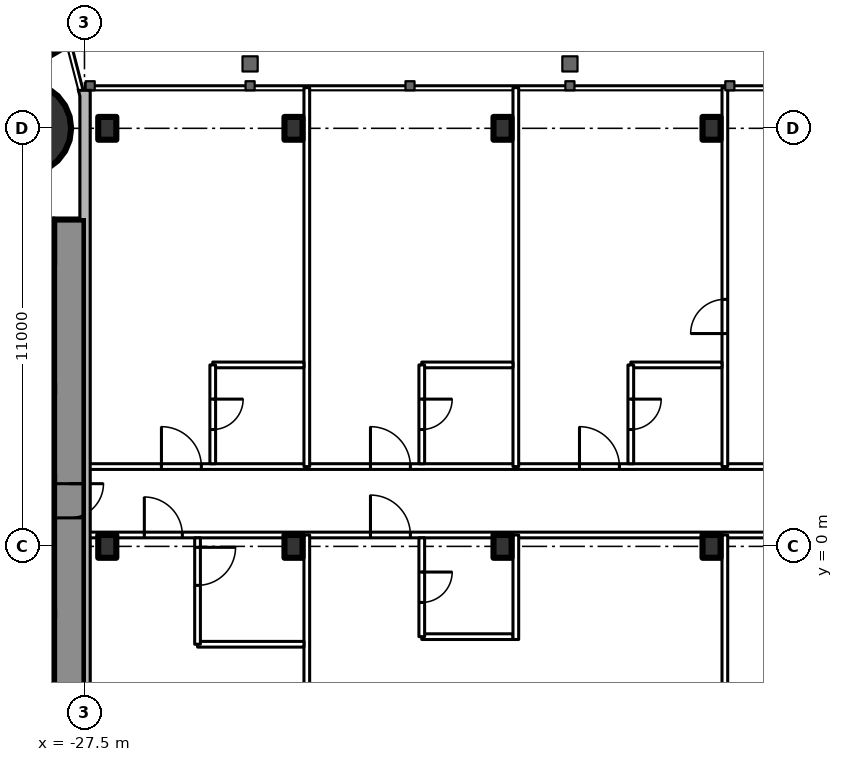
"""IFC4 building model, lengths in metres.
Left out: names, types, materials, properties, quantities, classifications, styles, units other than length and angle.
Written with IfcOpenShell. Run it as: python <this file> out.ifc"""

import sys

from ifc_helpers import new_model, si_unit, direction, frame, frame_2d, origin, origin_2d, place, context, subcontext, project, spatial, rectangle, circle, i_section, extrude, element, fill, save


model = new_model("IFC4")
c1 = context("Model", 3, precision=1e-05, world=origin(), true_north=direction((0.0, 1.0)))
c2 = subcontext(c1, "Body", "Model", "MODEL_VIEW")
j1 = project(units=[si_unit("LENGTHUNIT", "METRE"), si_unit("PLANEANGLEUNIT", "RADIAN")], contexts=[c1])
p1 = place(None, origin())
s1 = spatial("IfcSite", under=j1, at=p1, CompositionType="ELEMENT")
p2 = place(p1, origin())
s2 = spatial("IfcBuilding", under=s1, at=p2, CompositionType="ELEMENT")
p3 = place(p2, frame((0.0, 0.0, 233.3)))
s3 = spatial("IfcBuildingStorey", under=s2, at=p3, CompositionType="ELEMENT", Elevation=233.3)
p4 = place(p3, frame((-29.05, 11.0, 0.0), z_axis=(0.0, 0.0, 1.0), x_axis=(1.0, 0.0, 0.0)))
e1 = element("IfcColumn", 1, at=p4, inside=s3, PredefinedType="COLUMN", context=c2, shape_type="SweptSolid", body=[
    extrude(circle(Radius=1.2, at=origin_2d()), origin(), (0.0, 0.0, 1.0), 3.6),
])
p5 = place(p3, frame((-27.9, 8.6, 0.0), z_axis=(0.0, 0.0, 1.0), x_axis=(0.0, -1.0, 0.0)))
e2 = element("IfcWall", 2, at=p5, inside=s3, PredefinedType="SHEAR", context=c2, shape_type="SweptSolid", body=[
    extrude(rectangle(XDim=17.2, YDim=0.8, at=frame_2d((8.6, 0.0))), origin(), (0.0, 0.0, 1.0), 3.6),
])
p6 = place(p5, frame((6.95, 0.0, 0.0)))
e3 = element("IfcOpeningElement", 3, at=p6, cuts=e2, PredefinedType="OPENING", context=c2, shape_type="SweptSolid", body=[
    extrude(rectangle(XDim=0.9, YDim=2.2, at=frame_2d((0.45, 1.1))), frame((0.0, 0.41, 0.0), z_axis=(0.0, -1.0, 0.0), x_axis=(1.0, 0.0, 0.0)), (0.0, 0.0, 1.0), 0.82),
])
p7 = place(p3, frame((-28.3, 8.0, 0.0), z_axis=(0.0, 0.0, 1.0), x_axis=(-1.0, 0.0, 0.0)))
e4 = element("IfcWall", 4, at=p7, inside=s3, PredefinedType="SHEAR", context=c2, shape_type="SweptSolid", body=[
    extrude(rectangle(XDim=8.4, YDim=1.2, at=frame_2d((4.2, 0.0))), origin(), (0.0, 0.0, 1.0), 3.6),
])
p8 = place(p7, frame((0.25, 0.0, 0.0)))
e5 = element("IfcOpeningElement", 5, at=p8, cuts=e4, PredefinedType="OPENING", context=c2, shape_type="SweptSolid", body=[
    extrude(rectangle(XDim=1.0, YDim=2.2, at=frame_2d((0.5, 1.1))), frame((0.0, 0.61, 0.0), z_axis=(0.0, -1.0, 0.0), x_axis=(1.0, 0.0, 0.0)), (0.0, 0.0, 1.0), 1.22),
])
p9 = place(p3, frame((-28.3, 4.15, 0.0), z_axis=(0.0, 0.0, 1.0), x_axis=(-1.0, 0.0, 0.0)))
e6 = element("IfcWall", 6, at=p9, inside=s3, PredefinedType="SHEAR", context=c2, shape_type="SweptSolid", body=[
    extrude(rectangle(XDim=8.4, YDim=0.3, at=frame_2d((4.2, 0.0))), origin(), (0.0, 0.0, 1.0), 3.6),
])
for number, where, z_axis, x_axis in (
    (7, (-28.3, 1.775, 0.0), (0.0, 0.0, 1.0), (-1.0, 0.0, 0.0)),
    (8, (-28.3, -1.775, 0.0), (0.0, 0.0, 1.0), (-1.0, 0.0, 0.0)),
):
    element("IfcWall", number, at=place(p3, frame(where, z_axis=z_axis, x_axis=x_axis)), inside=s3, PredefinedType="SHEAR", context=c2, shape_type="SweptSolid", body=[
        extrude(rectangle(XDim=2.9, YDim=0.25, at=frame_2d((1.45, 0.0))), origin(), (0.0, 0.0, 1.0), 3.6),
    ])
p10 = place(p3, frame((-27.2, 14.3, 0.0), z_axis=(0.0, 0.0, 1.0), x_axis=(-0.866026593062, -0.499997940104, 0.0)))
e9 = element("IfcWall", 9, at=p10, inside=s3, PredefinedType="SHEAR", context=c2, shape_type="SweptSolid", body=[
    extrude(rectangle(XDim=28.946, YDim=1.2, at=frame_2d((14.473, 0.0))), origin(), (0.0, 0.0, 1.0), 3.6),
])
p11 = place(p10, frame((4.6, 0.0, 0.0)))
e10 = element("IfcOpeningElement", 10, at=p11, cuts=e9, PredefinedType="OPENING", context=c2, shape_type="SweptSolid", body=[
    extrude(rectangle(XDim=1.0, YDim=2.2, at=frame_2d((0.5, 1.1))), frame((0.0, 0.61, 0.0), z_axis=(0.0, -1.0, 0.0), x_axis=(1.0, 0.0, 0.0)), (0.0, 0.0, 1.0), 1.22),
])
p12 = place(p10, frame((13.395, 0.0, 0.0)))
e11 = element("IfcOpeningElement", 11, at=p12, cuts=e9, PredefinedType="OPENING", context=c2, shape_type="SweptSolid", body=[
    extrude(rectangle(XDim=1.8, YDim=2.2, at=frame_2d((0.9, 1.1))), frame((0.0, 0.61, 0.0), z_axis=(0.0, -1.0, 0.0), x_axis=(1.0, 0.0, 0.0)), (0.0, 0.0, 1.0), 1.22),
])
p13 = place(p3, frame((-27.2, -14.3, 0.0), z_axis=(0.0, 0.0, 1.0), x_axis=(-0.866024021859, 0.500002393557, 0.0)))
e12 = element("IfcWall", 12, at=p13, inside=s3, PredefinedType="SHEAR", context=c2, shape_type="SweptSolid", body=[
    extrude(rectangle(XDim=27.907, YDim=1.2, at=frame_2d((13.954, 0.0))), origin(), (0.0, 0.0, 1.0), 3.6),
])
p14 = place(p13, frame((4.6, 0.0, 0.0)))
e13 = element("IfcOpeningElement", 13, at=p14, cuts=e12, PredefinedType="OPENING", context=c2, shape_type="SweptSolid", body=[
    extrude(rectangle(XDim=1.0, YDim=2.2, at=frame_2d((0.5, 1.1))), frame((0.0, 0.61, 0.0), z_axis=(0.0, -1.0, 0.0), x_axis=(1.0, 0.0, 0.0)), (0.0, 0.0, 1.0), 1.22),
])
p15 = place(p13, frame((13.395, 0.0, 0.0)))
e14 = element("IfcOpeningElement", 14, at=p15, cuts=e12, PredefinedType="OPENING", context=c2, shape_type="SweptSolid", body=[
    extrude(rectangle(XDim=1.8, YDim=2.2, at=frame_2d((0.9, 1.1))), frame((0.0, 0.61, 0.0), z_axis=(0.0, -1.0, 0.0), x_axis=(1.0, 0.0, 0.0)), (0.0, 0.0, 1.0), 1.22),
])
for number, where, z_axis, x_axis in (
    (15, (-26.9, 0.0, 0.0), (0.0, 0.0, 1.0), (1.0, 0.0, 0.0)),
    (16, (-22.0, 0.0, 0.0), (0.0, 0.0, 1.0), (1.0, 0.0, 0.0)),
    (17, (-16.5, 0.0, 0.0), (0.0, 0.0, 1.0), (1.0, 0.0, 0.0)),
    (18, (-11.0, 0.0, 0.0), (0.0, 0.0, 1.0), (1.0, 0.0, 0.0)),
    (19, (-26.9, 11.0, 0.0), (0.0, 0.0, 1.0), (1.0, 0.0, 0.0)),
    (20, (-22.0, 11.0, 0.0), (0.0, 0.0, 1.0), (1.0, 0.0, 0.0)),
    (21, (-16.5, 11.0, 0.0), (0.0, 0.0, 1.0), (1.0, 0.0, 0.0)),
    (22, (-11.0, 11.0, 0.0), (0.0, 0.0, 1.0), (1.0, 0.0, 0.0)),
):
    element("IfcColumn", number, at=place(p3, frame(where, z_axis=z_axis, x_axis=x_axis)), inside=s3, PredefinedType="COLUMN", context=c2, shape_type="SweptSolid", body=[
        extrude(i_section(OverallWidth=0.476, OverallDepth=0.6, WebThickness=0.1, FlangeThickness=0.14, FilletRadius=0.02, at=origin_2d()), origin(), (0.0, 0.0, 1.0), 3.6),
    ])
p16 = place(p3, frame((-27.5, 0.3, 0.0), z_axis=(0.0, 0.0, 1.0), x_axis=(1.0, 0.0, 0.0)))
e23 = element("IfcWall", 23, at=p16, inside=s3, PredefinedType="PARTITIONING", context=c2, shape_type="SweptSolid", body=[
    extrude(rectangle(XDim=55.0, YDim=0.15, at=frame_2d((27.5, 0.0))), origin(), (0.0, 0.0, 1.0), 2.4),
])
p17 = place(p16, frame((1.575, 0.0, 0.0)))
e24 = element("IfcOpeningElement", 24, at=p17, cuts=e23, PredefinedType="OPENING", context=c2, shape_type="SweptSolid", body=[
    extrude(rectangle(XDim=1.0, YDim=2.2, at=frame_2d((0.5, 1.1))), frame((0.0, 0.085, 0.0), z_axis=(0.0, -1.0, 0.0), x_axis=(1.0, 0.0, 0.0)), (0.0, 0.0, 1.0), 0.17),
])
p18 = place(p16, frame((7.525, 0.0, 0.0)))
e25 = element("IfcOpeningElement", 25, at=p18, cuts=e23, PredefinedType="OPENING", context=c2, shape_type="SweptSolid", body=[
    extrude(rectangle(XDim=1.05, YDim=2.4, at=frame_2d((0.525, 1.2))), frame((0.0, 0.085, 0.0), z_axis=(0.0, -1.0, 0.0), x_axis=(1.0, 0.0, 0.0)), (0.0, 0.0, 1.0), 0.17),
])
p19 = place(p16, frame((18.525, 0.0, 0.0)))
e26 = element("IfcOpeningElement", 26, at=p19, cuts=e23, PredefinedType="OPENING", context=c2, shape_type="SweptSolid", body=[
    extrude(rectangle(XDim=1.05, YDim=2.4, at=frame_2d((0.525, 1.2))), frame((0.0, 0.085, 0.0), z_axis=(0.0, -1.0, 0.0), x_axis=(1.0, 0.0, 0.0)), (0.0, 0.0, 1.0), 0.17),
])
p20 = place(p16, frame((24.025, 0.0, 0.0)))
e27 = element("IfcOpeningElement", 27, at=p20, cuts=e23, PredefinedType="OPENING", context=c2, shape_type="SweptSolid", body=[
    extrude(rectangle(XDim=1.05, YDim=2.4, at=frame_2d((0.525, 1.2))), frame((0.0, 0.085, 0.0), z_axis=(0.0, -1.0, 0.0), x_axis=(1.0, 0.0, 0.0)), (0.0, 0.0, 1.0), 0.17),
])
p21 = place(p16, frame((35.025, 0.0, 0.0)))
e28 = element("IfcOpeningElement", 28, at=p21, cuts=e23, PredefinedType="OPENING", context=c2, shape_type="SweptSolid", body=[
    extrude(rectangle(XDim=1.05, YDim=2.4, at=frame_2d((0.525, 1.2))), frame((0.0, 0.085, 0.0), z_axis=(0.0, -1.0, 0.0), x_axis=(1.0, 0.0, 0.0)), (0.0, 0.0, 1.0), 0.17),
])
p22 = place(p16, frame((40.525, 0.0, 0.0)))
e29 = element("IfcOpeningElement", 29, at=p22, cuts=e23, PredefinedType="OPENING", context=c2, shape_type="SweptSolid", body=[
    extrude(rectangle(XDim=1.05, YDim=2.4, at=frame_2d((0.525, 1.2))), frame((0.0, 0.085, 0.0), z_axis=(0.0, -1.0, 0.0), x_axis=(1.0, 0.0, 0.0)), (0.0, 0.0, 1.0), 0.17),
])
p23 = place(p16, frame((52.525, 0.0, 0.0)))
e30 = element("IfcOpeningElement", 30, at=p23, cuts=e23, PredefinedType="OPENING", context=c2, shape_type="SweptSolid", body=[
    extrude(rectangle(XDim=1.05, YDim=2.4, at=frame_2d((0.525, 1.2))), frame((0.0, 0.085, 0.0), z_axis=(0.0, -1.0, 0.0), x_axis=(1.0, 0.0, 0.0)), (0.0, 0.0, 1.0), 0.17),
])
p24 = place(p3, frame((-27.5, 2.1, 0.0), z_axis=(0.0, 0.0, 1.0), x_axis=(1.0, 0.0, 0.0)))
e31 = element("IfcWall", 31, at=p24, inside=s3, PredefinedType="PARTITIONING", context=c2, shape_type="SweptSolid", body=[
    extrude(rectangle(XDim=22.35, YDim=0.15, at=frame_2d((11.175, 0.0))), origin(), (0.0, 0.0, 1.0), 3.4),
])
p25 = place(p24, frame((2.025, 0.0, 0.0)))
e32 = element("IfcOpeningElement", 32, at=p25, cuts=e31, PredefinedType="OPENING", context=c2, shape_type="SweptSolid", body=[
    extrude(rectangle(XDim=1.05, YDim=2.4, at=frame_2d((0.525, 1.2))), frame((0.0, 0.085, 0.0), z_axis=(0.0, -1.0, 0.0), x_axis=(1.0, 0.0, 0.0)), (0.0, 0.0, 1.0), 0.17),
])
p26 = place(p24, frame((7.525, 0.0, 0.0)))
e33 = element("IfcOpeningElement", 33, at=p26, cuts=e31, PredefinedType="OPENING", context=c2, shape_type="SweptSolid", body=[
    extrude(rectangle(XDim=1.05, YDim=2.4, at=frame_2d((0.525, 1.2))), frame((0.0, 0.085, 0.0), z_axis=(0.0, -1.0, 0.0), x_axis=(1.0, 0.0, 0.0)), (0.0, 0.0, 1.0), 0.17),
])
p27 = place(p24, frame((13.025, 0.0, 0.0)))
e34 = element("IfcOpeningElement", 34, at=p27, cuts=e31, PredefinedType="OPENING", context=c2, shape_type="SweptSolid", body=[
    extrude(rectangle(XDim=1.05, YDim=2.4, at=frame_2d((0.525, 1.2))), frame((0.0, 0.085, 0.0), z_axis=(0.0, -1.0, 0.0), x_axis=(1.0, 0.0, 0.0)), (0.0, 0.0, 1.0), 0.17),
])
p28 = place(p24, frame((18.525, 0.0, 0.0)))
e35 = element("IfcOpeningElement", 35, at=p28, cuts=e31, PredefinedType="OPENING", context=c2, shape_type="SweptSolid", body=[
    extrude(rectangle(XDim=1.05, YDim=2.4, at=frame_2d((0.525, 1.2))), frame((0.0, 0.085, 0.0), z_axis=(0.0, -1.0, 0.0), x_axis=(1.0, 0.0, 0.0)), (0.0, 0.0, 1.0), 0.17),
])
for number, where, z_axis, x_axis in (
    (36, (-21.65, -12.07, 0.0), (0.0, 0.0, 1.0), (0.0, 1.0, 0.0)),
    (37, (-10.65, -12.07, 0.0), (0.0, 0.0, 1.0), (0.0, 1.0, 0.0)),
):
    element("IfcWall", number, at=place(p3, frame(where, z_axis=z_axis, x_axis=x_axis)), inside=s3, PredefinedType="PARTITIONING", context=c2, shape_type="SweptSolid", body=[
        extrude(rectangle(XDim=12.37, YDim=0.15, at=frame_2d((6.185, 0.0))), origin(), (0.0, 0.0, 1.0), 3.4),
    ])
p29 = place(p3, frame((-24.525, -2.575, 0.0), z_axis=(0.0, 0.0, 1.0), x_axis=(1.0, 0.0, 0.0)))
e38 = element("IfcWall", 38, at=p29, inside=s3, PredefinedType="PARTITIONING", context=c2, shape_type="SweptSolid", body=[
    extrude(rectangle(XDim=2.8, YDim=0.15, at=frame_2d((1.4, 0.0))), origin(), (0.0, 0.0, 1.0), 3.4),
])
p30 = place(p3, frame((-24.525, -2.575, 0.0), z_axis=(0.0, 0.0, 1.0), x_axis=(0.0, 1.0, 0.0)))
e39 = element("IfcWall", 39, at=p30, inside=s3, PredefinedType="PARTITIONING", context=c2, shape_type="SweptSolid", body=[
    extrude(rectangle(XDim=2.8, YDim=0.15, at=frame_2d((1.4, 0.0))), origin(), (0.0, 0.0, 1.0), 3.4),
])
p31 = place(p30, frame((1.55, 0.0, 0.0)))
e40 = element("IfcOpeningElement", 40, at=p31, cuts=e39, PredefinedType="OPENING", context=c2, shape_type="SweptSolid", body=[
    extrude(rectangle(XDim=1.0, YDim=2.2, at=frame_2d((0.5, 1.1))), frame((0.0, 0.085, 0.0), z_axis=(0.0, -1.0, 0.0), x_axis=(1.0, 0.0, 0.0)), (0.0, 0.0, 1.0), 0.17),
])
p32 = place(p3, frame((-18.625, -2.375, 0.0), z_axis=(0.0, 0.0, 1.0), x_axis=(1.0, 0.0, 0.0)))
e41 = element("IfcWall", 41, at=p32, inside=s3, PredefinedType="PARTITIONING", context=c2, shape_type="SweptSolid", body=[
    extrude(rectangle(XDim=2.4, YDim=0.15, at=frame_2d((1.2, 0.0))), origin(), (0.0, 0.0, 1.0), 3.4),
])
p33 = place(p3, frame((-18.625, -2.375, 0.0), z_axis=(0.0, 0.0, 1.0), x_axis=(0.0, 1.0, 0.0)))
e42 = element("IfcWall", 42, at=p33, inside=s3, PredefinedType="PARTITIONING", context=c2, shape_type="SweptSolid", body=[
    extrude(rectangle(XDim=2.6, YDim=0.15, at=frame_2d((1.3, 0.0))), origin(), (0.0, 0.0, 1.0), 3.4),
])
p34 = place(p33, frame((0.9, 0.0, 0.0)))
e43 = element("IfcOpeningElement", 43, at=p34, cuts=e42, PredefinedType="OPENING", context=c2, shape_type="SweptSolid", body=[
    extrude(rectangle(XDim=0.8, YDim=2.2, at=frame_2d((0.4, 1.1))), frame((0.0, 0.085, 0.0), z_axis=(0.0, -1.0, 0.0), x_axis=(1.0, 0.0, 0.0)), (0.0, 0.0, 1.0), 0.17),
])
for number, where, z_axis, x_axis in (
    (44, (-21.65, 2.1, 0.0), (0.0, 0.0, 1.0), (0.0, 1.0, 0.0)),
    (45, (-16.15, 2.1, 0.0), (0.0, 0.0, 1.0), (0.0, 1.0, 0.0)),
):
    element("IfcWall", number, at=place(p3, frame(where, z_axis=z_axis, x_axis=x_axis)), inside=s3, PredefinedType="PARTITIONING", context=c2, shape_type="SweptSolid", body=[
        extrude(rectangle(XDim=9.97, YDim=0.15, at=frame_2d((4.985, 0.0))), origin(), (0.0, 0.0, 1.0), 3.4),
    ])
p35 = place(p3, frame((-10.65, 2.1, 0.0), z_axis=(0.0, 0.0, 1.0), x_axis=(0.0, 1.0, 0.0)))
e46 = element("IfcWall", 46, at=p35, inside=s3, PredefinedType="PARTITIONING", context=c2, shape_type="SweptSolid", body=[
    extrude(rectangle(XDim=9.97, YDim=0.15, at=frame_2d((4.985, 0.0))), origin(), (0.0, 0.0, 1.0), 3.4),
])
p36 = place(p35, frame((3.5, 0.0, 0.0)))
e47 = element("IfcOpeningElement", 47, at=p36, cuts=e46, PredefinedType="OPENING", context=c2, shape_type="SweptSolid", body=[
    extrude(rectangle(XDim=0.9, YDim=2.2, at=frame_2d((0.45, 1.1))), frame((0.0, 0.085, 0.0), z_axis=(0.0, -1.0, 0.0), x_axis=(1.0, 0.0, 0.0)), (0.0, 0.0, 1.0), 0.17),
])
p37 = place(p3, frame((-24.125, 4.775, 0.0), z_axis=(0.0, 0.0, 1.0), x_axis=(1.0, 0.0, 0.0)))
e48 = element("IfcWall", 48, at=p37, inside=s3, PredefinedType="PARTITIONING", context=c2, shape_type="SweptSolid", body=[
    extrude(rectangle(XDim=2.4, YDim=0.15, at=frame_2d((1.2, 0.0))), origin(), (0.0, 0.0, 1.0), 3.4),
])
p38 = place(p3, frame((-24.125, 2.175, 0.0), z_axis=(0.0, 0.0, 1.0), x_axis=(0.0, 1.0, 0.0)))
e49 = element("IfcWall", 49, at=p38, inside=s3, PredefinedType="PARTITIONING", context=c2, shape_type="SweptSolid", body=[
    extrude(rectangle(XDim=2.6, YDim=0.15, at=frame_2d((1.3, 0.0))), origin(), (0.0, 0.0, 1.0), 3.4),
])
p39 = place(p38, frame((0.9, 0.0, 0.0)))
e50 = element("IfcOpeningElement", 50, at=p39, cuts=e49, PredefinedType="OPENING", context=c2, shape_type="SweptSolid", body=[
    extrude(rectangle(XDim=0.8, YDim=2.2, at=frame_2d((0.4, 1.1))), frame((0.0, 0.085, 0.0), z_axis=(0.0, -1.0, 0.0), x_axis=(1.0, 0.0, 0.0)), (0.0, 0.0, 1.0), 0.17),
])
p40 = place(p3, frame((-18.625, 4.775, 0.0), z_axis=(0.0, 0.0, 1.0), x_axis=(1.0, 0.0, 0.0)))
e51 = element("IfcWall", 51, at=p40, inside=s3, PredefinedType="PARTITIONING", context=c2, shape_type="SweptSolid", body=[
    extrude(rectangle(XDim=2.4, YDim=0.15, at=frame_2d((1.2, 0.0))), origin(), (0.0, 0.0, 1.0), 3.4),
])
p41 = place(p3, frame((-18.625, 2.175, 0.0), z_axis=(0.0, 0.0, 1.0), x_axis=(0.0, 1.0, 0.0)))
e52 = element("IfcWall", 52, at=p41, inside=s3, PredefinedType="PARTITIONING", context=c2, shape_type="SweptSolid", body=[
    extrude(rectangle(XDim=2.6, YDim=0.15, at=frame_2d((1.3, 0.0))), origin(), (0.0, 0.0, 1.0), 3.4),
])
p42 = place(p41, frame((0.9, 0.0, 0.0)))
e53 = element("IfcOpeningElement", 53, at=p42, cuts=e52, PredefinedType="OPENING", context=c2, shape_type="SweptSolid", body=[
    extrude(rectangle(XDim=0.8, YDim=2.2, at=frame_2d((0.4, 1.1))), frame((0.0, 0.085, 0.0), z_axis=(0.0, -1.0, 0.0), x_axis=(1.0, 0.0, 0.0)), (0.0, 0.0, 1.0), 0.17),
])
p43 = place(p3, frame((-13.125, 4.775, 0.0), z_axis=(0.0, 0.0, 1.0), x_axis=(1.0, 0.0, 0.0)))
e54 = element("IfcWall", 54, at=p43, inside=s3, PredefinedType="PARTITIONING", context=c2, shape_type="SweptSolid", body=[
    extrude(rectangle(XDim=2.4, YDim=0.15, at=frame_2d((1.2, 0.0))), origin(), (0.0, 0.0, 1.0), 3.4),
])
p44 = place(p3, frame((-13.125, 2.175, 0.0), z_axis=(0.0, 0.0, 1.0), x_axis=(0.0, 1.0, 0.0)))
e55 = element("IfcWall", 55, at=p44, inside=s3, PredefinedType="PARTITIONING", context=c2, shape_type="SweptSolid", body=[
    extrude(rectangle(XDim=2.6, YDim=0.15, at=frame_2d((1.3, 0.0))), origin(), (0.0, 0.0, 1.0), 3.4),
])
p45 = place(p44, frame((0.9, 0.0, 0.0)))
e56 = element("IfcOpeningElement", 56, at=p45, cuts=e55, PredefinedType="OPENING", context=c2, shape_type="SweptSolid", body=[
    extrude(rectangle(XDim=0.8, YDim=2.2, at=frame_2d((0.4, 1.1))), frame((0.0, 0.085, 0.0), z_axis=(0.0, -1.0, 0.0), x_axis=(1.0, 0.0, 0.0)), (0.0, 0.0, 1.0), 0.17),
])
p46 = place(p3, frame((-16.15, -2.45, 0.0), z_axis=(0.0, 0.0, 1.0), x_axis=(0.0, 1.0, 0.0)))
e57 = element("IfcWall", 57, at=p46, inside=s3, PredefinedType="PARTITIONING", context=c2, shape_type="SweptSolid", body=[
    extrude(rectangle(XDim=2.75, YDim=0.15, at=frame_2d((1.375, 0.0))), origin(), (0.0, 0.0, 1.0), 3.4),
])
p47 = place(p6, origin())
e58 = element("IfcDoor", 58, at=p47, inside=s3, OperationType="SINGLE_SWING_LEFT", PredefinedType="DOOR", context=c2, shape_type="SweptSolid", body=[
    extrude(rectangle(XDim=0.9, YDim=2.2, at=frame_2d((0.45, 1.1))), frame((0.0, 0.025, 0.0), z_axis=(0.0, -1.0, 0.0), x_axis=(1.0, 0.0, 0.0)), (0.0, 0.0, 1.0), 0.05),
])
fill(e3, e58)
p48 = place(p31, origin())
e59 = element("IfcDoor", 59, at=p48, inside=s3, OperationType="SINGLE_SWING_RIGHT", PredefinedType="DOOR", context=c2, shape_type="SweptSolid", body=[
    extrude(rectangle(XDim=1.0, YDim=2.2, at=frame_2d((0.5, 1.1))), frame((0.0, 0.025, 0.0), z_axis=(0.0, -1.0, 0.0), x_axis=(1.0, 0.0, 0.0)), (0.0, 0.0, 1.0), 0.05),
])
fill(e40, e59)
p49 = place(p17, origin())
e60 = element("IfcDoor", 60, at=p49, inside=s3, OperationType="SINGLE_SWING_LEFT", PredefinedType="DOOR", context=c2, shape_type="SweptSolid", body=[
    extrude(rectangle(XDim=1.0, YDim=2.2, at=frame_2d((0.5, 1.1))), frame((0.0, 0.025, 0.0), z_axis=(0.0, -1.0, 0.0), x_axis=(1.0, 0.0, 0.0)), (0.0, 0.0, 1.0), 0.05),
])
fill(e24, e60)
p50 = place(p34, origin())
e61 = element("IfcDoor", 61, at=p50, inside=s3, OperationType="SINGLE_SWING_RIGHT", PredefinedType="DOOR", context=c2, shape_type="SweptSolid", body=[
    extrude(rectangle(XDim=0.8, YDim=2.2, at=frame_2d((0.4, 1.1))), frame((0.0, 0.025, 0.0), z_axis=(0.0, -1.0, 0.0), x_axis=(1.0, 0.0, 0.0)), (0.0, 0.0, 1.0), 0.05),
])
fill(e43, e61)
p51 = place(p18, origin())
e62 = element("IfcDoor", 62, at=p51, inside=s3, OperationType="SINGLE_SWING_LEFT", PredefinedType="DOOR", context=c2, shape_type="SweptSolid", body=[
    extrude(rectangle(XDim=1.05, YDim=2.4, at=frame_2d((0.525, 1.2))), frame((0.0, 0.025, 0.0), z_axis=(0.0, -1.0, 0.0), x_axis=(1.0, 0.0, 0.0)), (0.0, 0.0, 1.0), 0.05),
])
fill(e25, e62)
p52 = place(p39, origin())
e63 = element("IfcDoor", 63, at=p52, inside=s3, OperationType="SINGLE_SWING_RIGHT", PredefinedType="DOOR", context=c2, shape_type="SweptSolid", body=[
    extrude(rectangle(XDim=0.8, YDim=2.2, at=frame_2d((0.4, 1.1))), frame((0.0, 0.025, 0.0), z_axis=(0.0, -1.0, 0.0), x_axis=(1.0, 0.0, 0.0)), (0.0, 0.0, 1.0), 0.05),
])
fill(e50, e63)
p53 = place(p25, origin())
e64 = element("IfcDoor", 64, at=p53, inside=s3, OperationType="SINGLE_SWING_LEFT", PredefinedType="DOOR", context=c2, shape_type="SweptSolid", body=[
    extrude(rectangle(XDim=1.05, YDim=2.4, at=frame_2d((0.525, 1.2))), frame((0.0, 0.025, 0.0), z_axis=(0.0, -1.0, 0.0), x_axis=(1.0, 0.0, 0.0)), (0.0, 0.0, 1.0), 0.05),
])
fill(e32, e64)
p54 = place(p42, origin())
e65 = element("IfcDoor", 65, at=p54, inside=s3, OperationType="SINGLE_SWING_RIGHT", PredefinedType="DOOR", context=c2, shape_type="SweptSolid", body=[
    extrude(rectangle(XDim=0.8, YDim=2.2, at=frame_2d((0.4, 1.1))), frame((0.0, 0.025, 0.0), z_axis=(0.0, -1.0, 0.0), x_axis=(1.0, 0.0, 0.0)), (0.0, 0.0, 1.0), 0.05),
])
fill(e53, e65)
p55 = place(p26, origin())
e66 = element("IfcDoor", 66, at=p55, inside=s3, OperationType="SINGLE_SWING_LEFT", PredefinedType="DOOR", context=c2, shape_type="SweptSolid", body=[
    extrude(rectangle(XDim=1.05, YDim=2.4, at=frame_2d((0.525, 1.2))), frame((0.0, 0.025, 0.0), z_axis=(0.0, -1.0, 0.0), x_axis=(1.0, 0.0, 0.0)), (0.0, 0.0, 1.0), 0.05),
])
fill(e33, e66)
p56 = place(p45, origin())
e67 = element("IfcDoor", 67, at=p56, inside=s3, OperationType="SINGLE_SWING_RIGHT", PredefinedType="DOOR", context=c2, shape_type="SweptSolid", body=[
    extrude(rectangle(XDim=0.8, YDim=2.2, at=frame_2d((0.4, 1.1))), frame((0.0, 0.025, 0.0), z_axis=(0.0, -1.0, 0.0), x_axis=(1.0, 0.0, 0.0)), (0.0, 0.0, 1.0), 0.05),
])
fill(e56, e67)
p57 = place(p27, origin())
e68 = element("IfcDoor", 68, at=p57, inside=s3, OperationType="SINGLE_SWING_LEFT", PredefinedType="DOOR", context=c2, shape_type="SweptSolid", body=[
    extrude(rectangle(XDim=1.05, YDim=2.4, at=frame_2d((0.525, 1.2))), frame((0.0, 0.025, 0.0), z_axis=(0.0, -1.0, 0.0), x_axis=(1.0, 0.0, 0.0)), (0.0, 0.0, 1.0), 0.05),
])
fill(e34, e68)
p58 = place(p36, origin())
e69 = element("IfcDoor", 69, at=p58, inside=s3, OperationType="SINGLE_SWING_LEFT", PredefinedType="DOOR", context=c2, shape_type="SweptSolid", body=[
    extrude(rectangle(XDim=0.9, YDim=2.2, at=frame_2d((0.45, 1.1))), frame((0.0, 0.025, 0.0), z_axis=(0.0, -1.0, 0.0), x_axis=(1.0, 0.0, 0.0)), (0.0, 0.0, 1.0), 0.05),
])
fill(e47, e69)
save(model, sys.argv[1])
